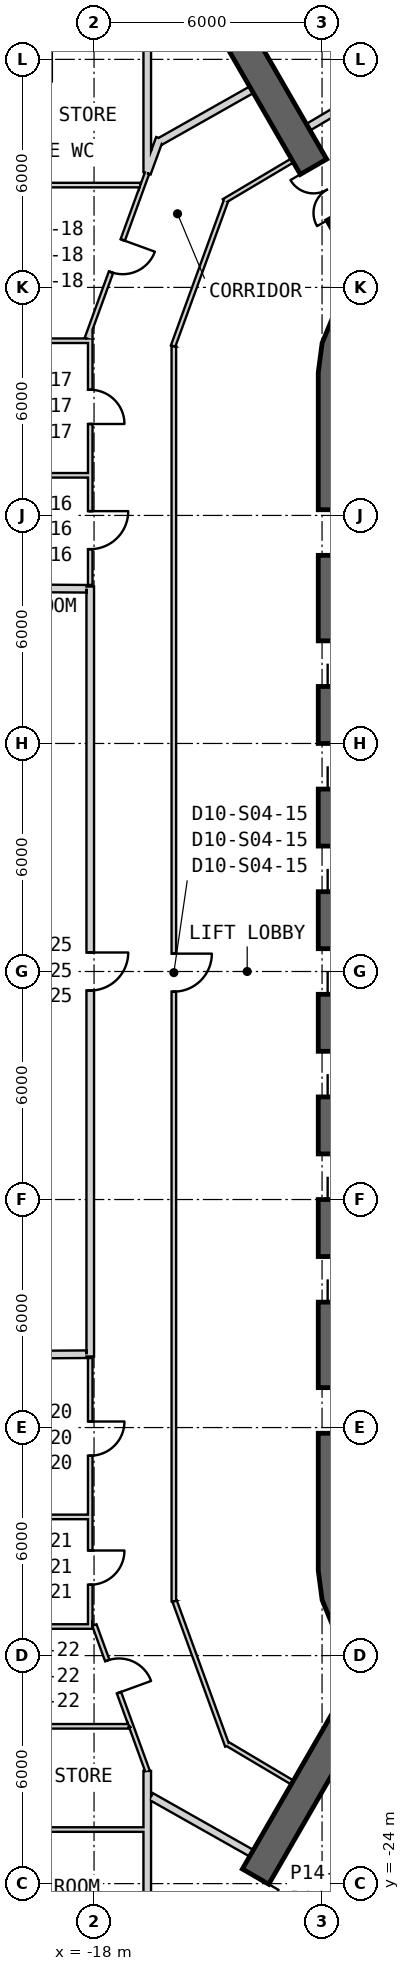
"""IFC4 building model, lengths in metres.
Left out: names, types, materials, properties, quantities, classifications, styles, units other than length and angle.
Written with IfcOpenShell. Run it as: python <this file> out.ifc"""

import sys

from ifc_helpers import new_model, si_unit, direction, frame, frame_2d, origin, place, context, subcontext, project, spatial, polyline, rectangle, outline, extrude, element, fill, save


model = new_model("IFC4")
c1 = context("Model", 3, precision=1e-05, world=origin(), true_north=direction((0.0, 1.0)))
c2 = subcontext(c1, "Body", "Model", "MODEL_VIEW")
j1 = project(units=[si_unit("LENGTHUNIT", "METRE"), si_unit("PLANEANGLEUNIT", "RADIAN")], contexts=[c1])
p1 = place(None, origin())
s1 = spatial("IfcSite", under=j1, at=p1, CompositionType="ELEMENT")
p2 = place(p1, origin())
s2 = spatial("IfcBuilding", under=s1, at=p2, CompositionType="ELEMENT")
p3 = place(p2, frame((0.0, 0.0, 94.7)))
s3 = spatial("IfcBuildingStorey", under=s2, at=p3, CompositionType="ELEMENT", Elevation=94.7)
p4 = place(p3, frame((-11.65, 15.762, 0.0), z_axis=(0.0, 0.0, 1.0), x_axis=(0.0, -1.0, 0.0)))
e1 = element("IfcWall", 1, at=p4, inside=s3, PredefinedType="SHEAR", context=c2, shape_type="SweptSolid", body=[
    extrude(rectangle(XDim=31.523, YDim=0.9, at=frame_2d((15.762, 0.0))), origin(), (0.0, 0.0, 1.0), 4.1),
])
p5 = place(p4, frame((7.062, 0.0, 0.0)))
e2 = element("IfcOpeningElement", 2, at=p5, cuts=e1, PredefinedType="OPENING", context=c2, shape_type="SweptSolid", body=[
    extrude(rectangle(XDim=1.2, YDim=2.4, at=frame_2d((0.6, 1.2))), frame((0.0, 0.46, 0.0), z_axis=(0.0, -1.0, 0.0), x_axis=(1.0, 0.0, 0.0)), (0.0, 0.0, 1.0), 0.92),
])
p6 = place(p4, frame((9.762, 0.0, 0.0)))
e3 = element("IfcOpeningElement", 3, at=p6, cuts=e1, PredefinedType="OPENING", context=c2, shape_type="SweptSolid", body=[
    extrude(rectangle(XDim=1.2, YDim=2.4, at=frame_2d((0.6, 1.2))), frame((0.0, 0.46, 0.0), z_axis=(0.0, -1.0, 0.0), x_axis=(1.0, 0.0, 0.0)), (0.0, 0.0, 1.0), 0.92),
])
p7 = place(p4, frame((12.462, 0.0, 0.0)))
e4 = element("IfcOpeningElement", 4, at=p7, cuts=e1, PredefinedType="OPENING", context=c2, shape_type="SweptSolid", body=[
    extrude(rectangle(XDim=1.2, YDim=2.4, at=frame_2d((0.6, 1.2))), frame((0.0, 0.46, 0.0), z_axis=(0.0, -1.0, 0.0), x_axis=(1.0, 0.0, 0.0)), (0.0, 0.0, 1.0), 0.92),
])
p8 = place(p4, frame((15.162, 0.0, 0.0)))
e5 = element("IfcOpeningElement", 5, at=p8, cuts=e1, PredefinedType="OPENING", context=c2, shape_type="SweptSolid", body=[
    extrude(rectangle(XDim=1.2, YDim=2.4, at=frame_2d((0.6, 1.2))), frame((0.0, 0.46, 0.0), z_axis=(0.0, -1.0, 0.0), x_axis=(1.0, 0.0, 0.0)), (0.0, 0.0, 1.0), 0.92),
])
p9 = place(p4, frame((17.862, 0.0, 0.0)))
e6 = element("IfcOpeningElement", 6, at=p9, cuts=e1, PredefinedType="OPENING", context=c2, shape_type="SweptSolid", body=[
    extrude(rectangle(XDim=1.2, YDim=2.4, at=frame_2d((0.6, 1.2))), frame((0.0, 0.46, 0.0), z_axis=(0.0, -1.0, 0.0), x_axis=(1.0, 0.0, 0.0)), (0.0, 0.0, 1.0), 0.92),
])
p10 = place(p4, frame((20.562, 0.0, 0.0)))
e7 = element("IfcOpeningElement", 7, at=p10, cuts=e1, PredefinedType="OPENING", context=c2, shape_type="SweptSolid", body=[
    extrude(rectangle(XDim=1.2, YDim=2.4, at=frame_2d((0.6, 1.2))), frame((0.0, 0.46, 0.0), z_axis=(0.0, -1.0, 0.0), x_axis=(1.0, 0.0, 0.0)), (0.0, 0.0, 1.0), 0.92),
])
p11 = place(p4, frame((23.262, 0.0, 0.0)))
e8 = element("IfcOpeningElement", 8, at=p11, cuts=e1, PredefinedType="OPENING", context=c2, shape_type="SweptSolid", body=[
    extrude(rectangle(XDim=1.2, YDim=2.4, at=frame_2d((0.6, 1.2))), frame((0.0, 0.46, 0.0), z_axis=(0.0, -1.0, 0.0), x_axis=(1.0, 0.0, 0.0)), (0.0, 0.0, 1.0), 0.92),
])
p12 = place(p4, frame((3.612, 0.0, 0.0)))
e9 = element("IfcOpeningElement", 9, at=p12, cuts=e1, PredefinedType="OPENING", context=c2, shape_type="SweptSolid", body=[
    extrude(rectangle(XDim=1.2, YDim=2.4, at=frame_2d((0.6, 1.2))), frame((0.0, 0.46, 0.0), z_axis=(0.0, -1.0, 0.0), x_axis=(1.0, 0.0, 0.0)), (0.0, 0.0, 1.0), 0.92),
])
p13 = place(p4, frame((26.712, 0.0, 0.0)))
e10 = element("IfcOpeningElement", 10, at=p13, cuts=e1, PredefinedType="OPENING", context=c2, shape_type="SweptSolid", body=[
    extrude(rectangle(XDim=1.2, YDim=2.4, at=frame_2d((0.6, 1.2))), frame((0.0, 0.46, 0.0), z_axis=(0.0, -1.0, 0.0), x_axis=(1.0, 0.0, 0.0)), (0.0, 0.0, 1.0), 0.92),
])
p14 = place(p3, origin())
e11 = element("IfcWall", 11, at=p14, inside=s3, PredefinedType="SHEAR", context=c2, shape_type="SweptSolid", body=[
    extrude(outline(polyline([(-7.6, 18.36), (-8.323, 18.659), (-9.1, 18.762), (-9.876, 18.659), (-10.6, 18.36), (-11.221, 17.883), (-11.698, 17.262), (-11.998, 16.538), (-12.1, 15.762), (-11.2, 15.762), (-11.128, 16.305), (-10.919, 16.812), (-10.585, 17.247), (-10.15, 17.58), (-9.644, 17.79), (-9.1, 17.862), (-8.556, 17.79), (-8.05, 17.58), (-7.6, 18.36)])), origin(), (0.0, 0.0, 1.0), 4.1),
])
p15 = place(p3, origin())
e12 = element("IfcWall", 12, at=p15, inside=s3, PredefinedType="SHEAR", context=c2, shape_type="SweptSolid", body=[
    extrude(outline(polyline([(-12.1, -15.762), (-11.998, -16.538), (-11.698, -17.262), (-11.221, -17.883), (-10.6, -18.36), (-9.876, -18.659), (-9.1, -18.762), (-8.323, -18.659), (-7.6, -18.36), (-8.05, -17.58), (-8.556, -17.79), (-9.1, -17.862), (-9.644, -17.79), (-10.15, -17.58), (-10.585, -17.247), (-10.919, -16.812), (-11.128, -16.305), (-11.2, -15.762), (-12.1, -15.762)])), origin(), (0.0, 0.0, 1.0), 4.1),
])
p16 = place(p3, frame((-10.575, 18.316, 0.0), z_axis=(0.0, 0.0, 1.0), x_axis=(-0.500006018292, 0.866021929094, 0.0)))
e13 = element("IfcWall", 13, at=p16, inside=s3, PredefinedType="SHEAR", context=c2, shape_type="SweptSolid", body=[
    extrude(rectangle(XDim=13.241, YDim=0.8, at=frame_2d((6.621, 0.0))), origin(), (0.0, 0.0, 1.0), 4.1),
])
p17 = place(p16, frame((1.9, 0.0, 0.0)))
e14 = element("IfcOpeningElement", 14, at=p17, cuts=e13, PredefinedType="OPENING", context=c2, shape_type="SweptSolid", body=[
    extrude(rectangle(XDim=1.4, YDim=2.4, at=frame_2d((0.7, 1.2))), frame((0.0, 0.41, 0.0), z_axis=(0.0, -1.0, 0.0), x_axis=(1.0, 0.0, 0.0)), (0.0, 0.0, 1.0), 0.82),
])
p18 = place(p3, frame((-10.575, -18.316, 0.0), z_axis=(0.0, 0.0, 1.0), x_axis=(-0.500006018292, -0.866021929094, 0.0)))
e15 = element("IfcWall", 15, at=p18, inside=s3, PredefinedType="SHEAR", context=c2, shape_type="SweptSolid", body=[
    extrude(rectangle(XDim=13.241, YDim=0.8, at=frame_2d((6.621, 0.0))), origin(), (0.0, 0.0, 1.0), 4.1),
])
p19 = place(p18, frame((6.35, 0.0, 0.0)))
e16 = element("IfcOpeningElement", 16, at=p19, cuts=e15, PredefinedType="OPENING", context=c2, shape_type="SweptSolid", body=[
    extrude(rectangle(XDim=1.4, YDim=2.4, at=frame_2d((0.7, 1.2))), frame((0.0, 0.41, 0.0), z_axis=(0.0, -1.0, 0.0), x_axis=(1.0, 0.0, 0.0)), (0.0, 0.0, 1.0), 0.82),
])
p20 = place(p3, frame((-12.782, 21.339, 0.0), z_axis=(0.0, 0.0, 1.0), x_axis=(-0.859769901207, -0.510681619973, 0.0)))
e17 = element("IfcWall", 17, at=p20, inside=s3, PredefinedType="PARTITIONING", context=c2, shape_type="SweptSolid", body=[
    extrude(rectangle(XDim=2.093, YDim=0.12, at=frame_2d((1.046, 0.0))), origin(), (0.0, 0.0, 1.0), 3.8),
])
p21 = place(p3, frame((-14.528, 20.282, 0.0), z_axis=(0.0, 0.0, 1.0), x_axis=(-0.341969257767, -0.939711140054, 0.0)))
e18 = element("IfcWall", 18, at=p21, inside=s3, PredefinedType="PARTITIONING", context=c2, shape_type="SweptSolid", body=[
    extrude(rectangle(XDim=4.073, YDim=0.12, at=frame_2d((2.037, 0.0))), origin(), (0.0, 0.0, 1.0), 2.88),
])
p22 = place(p3, frame((-15.9, 16.451, 0.0), z_axis=(0.0, 0.0, 1.0), x_axis=(0.0, -1.0, 0.0)))
e19 = element("IfcWall", 19, at=p22, inside=s3, PredefinedType="PARTITIONING", context=c2, shape_type="SweptSolid", body=[
    extrude(rectangle(XDim=33.022, YDim=0.12, at=frame_2d((16.511, 0.0))), origin(), (0.0, 0.0, 1.0), 2.98),
])
p23 = place(p22, frame((15.981, 0.0, 0.0)))
e20 = element("IfcOpeningElement", 20, at=p23, cuts=e19, PredefinedType="OPENING", context=c2, shape_type="SweptSolid", body=[
    extrude(rectangle(XDim=1.0, YDim=2.1, at=frame_2d((0.5, 1.05))), frame((0.0, 0.07, 0.0), z_axis=(0.0, -1.0, 0.0), x_axis=(1.0, 0.0, 0.0)), (0.0, 0.0, 1.0), 0.14),
])
p24 = place(p3, frame((-15.879, -16.567, 0.0), z_axis=(0.0, 0.0, 1.0), x_axis=(0.341999322503, -0.939700198685, 0.0)))
e21 = element("IfcWall", 21, at=p24, inside=s3, PredefinedType="PARTITIONING", context=c2, shape_type="SweptSolid", body=[
    extrude(rectangle(XDim=4.054, YDim=0.12, at=frame_2d((2.027, 0.0))), origin(), (0.0, 0.0, 1.0), 2.88),
])
p25 = place(p3, frame((-14.494, -20.322, 0.0), z_axis=(0.0, 0.0, 1.0), x_axis=(0.859745408261, -0.510722853389, 0.0)))
e22 = element("IfcWall", 22, at=p25, inside=s3, PredefinedType="PARTITIONING", context=c2, shape_type="SweptSolid", body=[
    extrude(rectangle(XDim=1.991, YDim=0.12, at=frame_2d((0.996, 0.0))), origin(), (0.0, 0.0, 1.0), 3.8),
])
p26 = place(p3, frame((-18.1, 10.13, 0.0), z_axis=(0.0, 0.0, 1.0), x_axis=(0.0, -1.0, 0.0)))
e23 = element("IfcWall", 23, at=p26, inside=s3, PredefinedType="PARTITIONING", context=c2, shape_type="SweptSolid", body=[
    extrude(rectangle(XDim=20.26, YDim=0.2, at=frame_2d((10.13, 0.0))), origin(), (0.0, 0.0, 1.0), 3.08),
])
p27 = place(p26, frame((9.63, 0.0, 0.0)))
e24 = element("IfcOpeningElement", 24, at=p27, cuts=e23, PredefinedType="OPENING", context=c2, shape_type="SweptSolid", body=[
    extrude(rectangle(XDim=1.0, YDim=2.1, at=frame_2d((0.5, 1.05))), frame((0.0, 0.11, 0.0), z_axis=(0.0, -1.0, 0.0), x_axis=(1.0, 0.0, 0.0)), (0.0, 0.0, 1.0), 0.22),
])
p28 = place(p3, frame((-16.5, -21.706, 0.0), z_axis=(0.0, 0.0, 1.0), x_axis=(0.870637705421, -0.491924776668, 0.0)))
e25 = element("IfcWall", 25, at=p28, inside=s3, PredefinedType="PARTITIONING", context=c2, shape_type="SweptSolid", body=[
    extrude(rectangle(XDim=3.036, YDim=0.2, at=frame_2d((1.518, 0.0))), origin(), (0.0, 0.0, 1.0), 3.8),
])
p29 = place(p3, frame((-16.271, 21.923, 0.0), z_axis=(0.0, 0.0, 1.0), x_axis=(-0.342165073447, -0.939639857878, 0.0)))
e26 = element("IfcWall", 26, at=p29, inside=s3, PredefinedType="PARTITIONING", context=c2, shape_type="SweptSolid", body=[
    extrude(rectangle(XDim=0.975, YDim=0.2, at=frame_2d((0.488, 0.0))), origin(), (0.0, 0.0, 1.0), 2.88),
])
p30 = place(p3, frame((-13.856, 23.2, 0.0), z_axis=(0.0, 0.0, 1.0), x_axis=(-0.870639942446, -0.491920817426, 0.0)))
e27 = element("IfcWall", 27, at=p30, inside=s3, PredefinedType="PARTITIONING", context=c2, shape_type="SweptSolid", body=[
    extrude(rectangle(XDim=2.771, YDim=0.2, at=frame_2d((1.386, 0.0))), origin(), (0.0, 0.0, 1.0), 3.8),
])
p31 = place(p3, frame((-18.1, 16.899, 0.0), z_axis=(0.0, 0.0, 1.0), x_axis=(0.0, -1.0, 0.0)))
e28 = element("IfcWall", 28, at=p31, inside=s3, PredefinedType="PARTITIONING", context=c2, shape_type="SweptSolid", body=[
    extrude(rectangle(XDim=6.729, YDim=0.12, at=frame_2d((3.365, 0.0))), origin(), (0.0, 0.0, 1.0), 3.08),
])
p32 = place(p31, frame((4.786, 0.0, 0.0)))
e29 = element("IfcOpeningElement", 29, at=p32, cuts=e28, PredefinedType="OPENING", context=c2, shape_type="SweptSolid", body=[
    extrude(rectangle(XDim=1.0, YDim=2.1, at=frame_2d((0.5, 1.05))), frame((0.0, 0.07, 0.0), z_axis=(0.0, -1.0, 0.0), x_axis=(1.0, 0.0, 0.0)), (0.0, 0.0, 1.0), 0.14),
])
p33 = place(p31, frame((1.593, 0.0, 0.0)))
e30 = element("IfcOpeningElement", 30, at=p33, cuts=e28, PredefinedType="OPENING", context=c2, shape_type="SweptSolid", body=[
    extrude(rectangle(XDim=0.9, YDim=2.1, at=frame_2d((0.45, 1.05))), frame((0.0, 0.07, 0.0), z_axis=(0.0, -1.0, 0.0), x_axis=(1.0, 0.0, 0.0)), (0.0, 0.0, 1.0), 0.14),
])
p34 = place(p3, frame((-18.1, -10.17, 0.0), z_axis=(0.0, 0.0, 1.0), x_axis=(0.0, -1.0, 0.0)))
e31 = element("IfcWall", 31, at=p34, inside=s3, PredefinedType="PARTITIONING", context=c2, shape_type="SweptSolid", body=[
    extrude(rectangle(XDim=7.005, YDim=0.12, at=frame_2d((3.503, 0.0))), origin(), (0.0, 0.0, 1.0), 3.08),
])
p35 = place(p34, frame((1.671, 0.0, 0.0)))
e32 = element("IfcOpeningElement", 32, at=p35, cuts=e31, PredefinedType="OPENING", context=c2, shape_type="SweptSolid", body=[
    extrude(rectangle(XDim=0.9, YDim=2.1, at=frame_2d((0.45, 1.05))), frame((0.0, 0.07, 0.0), z_axis=(0.0, -1.0, 0.0), x_axis=(1.0, 0.0, 0.0)), (0.0, 0.0, 1.0), 0.14),
])
p36 = place(p34, frame((5.065, 0.0, 0.0)))
e33 = element("IfcOpeningElement", 33, at=p36, cuts=e31, PredefinedType="OPENING", context=c2, shape_type="SweptSolid", body=[
    extrude(rectangle(XDim=0.9, YDim=2.1, at=frame_2d((0.45, 1.05))), frame((0.0, 0.07, 0.0), z_axis=(0.0, -1.0, 0.0), x_axis=(1.0, 0.0, 0.0)), (0.0, 0.0, 1.0), 0.14),
])
p37 = place(p3, frame((-16.605, 21.006, 0.0), z_axis=(0.0, 0.0, 1.0), x_axis=(-0.342014101174, -0.939694819927, 0.0)))
e34 = element("IfcWall", 34, at=p37, inside=s3, PredefinedType="PARTITIONING", context=c2, shape_type="SweptSolid", body=[
    extrude(rectangle(XDim=4.628, YDim=0.12, at=frame_2d((2.314, 0.0))), origin(), (0.0, 0.0, 1.0), 2.98),
])
p38 = place(p37, frame((1.871, 0.0, 0.0)))
e35 = element("IfcOpeningElement", 35, at=p38, cuts=e34, PredefinedType="OPENING", context=c2, shape_type="SweptSolid", body=[
    extrude(rectangle(XDim=0.9, YDim=2.1, at=frame_2d((0.45, 1.05))), frame((0.0, 0.07, 0.0), z_axis=(0.0, -1.0, 0.0), x_axis=(1.0, 0.0, 0.0)), (0.0, 0.0, 1.0), 0.14),
])
p39 = place(p3, frame((-17.992, -17.196, 0.0), z_axis=(0.0, 0.0, 1.0), x_axis=(0.341997880797, -0.939700723385, 0.0)))
e36 = element("IfcWall", 36, at=p39, inside=s3, PredefinedType="PARTITIONING", context=c2, shape_type="SweptSolid", body=[
    extrude(rectangle(XDim=2.846, YDim=0.12, at=frame_2d((1.423, 0.0))), origin(), (0.0, 0.0, 1.0), 2.98),
])
p40 = place(p39, frame((0.994, 0.0, 0.0)))
e37 = element("IfcOpeningElement", 37, at=p40, cuts=e36, PredefinedType="OPENING", context=c2, shape_type="SweptSolid", body=[
    extrude(rectangle(XDim=0.9, YDim=2.1, at=frame_2d((0.45, 1.05))), frame((0.0, 0.07, 0.0), z_axis=(0.0, -1.0, 0.0), x_axis=(1.0, 0.0, 0.0)), (0.0, 0.0, 1.0), 0.14),
])
p41 = place(p3, frame((-17.019, -19.87, 0.0), z_axis=(0.0, 0.0, 1.0), x_axis=(0.341976406316, -0.939708538603, 0.0)))
e38 = element("IfcWall", 38, at=p41, inside=s3, PredefinedType="PARTITIONING", context=c2, shape_type="SweptSolid", body=[
    extrude(rectangle(XDim=1.26, YDim=0.12, at=frame_2d((0.63, 0.0))), origin(), (0.0, 0.0, 1.0), 2.88),
])
p42 = place(p3, frame((-10.339, 23.415, 0.0), z_axis=(0.0, 0.0, 1.0), x_axis=(-0.860316803263, -0.509759745393, 0.0)))
e39 = element("IfcWall", 39, at=p42, inside=s3, PredefinedType="PARTITIONING", context=c2, shape_type="SweptSolid", body=[
    extrude(rectangle(XDim=2.354, YDim=0.2, at=frame_2d((1.177, 0.0))), origin(), (0.0, 0.0, 1.0), 3.8),
])
p43 = place(p3, frame((-18.2, 10.071, 0.0), z_axis=(0.0, 0.0, 1.0), x_axis=(-0.999977091955, 0.006768719685, 0.0)))
e40 = element("IfcWall", 40, at=p43, inside=s3, PredefinedType="PARTITIONING", context=c2, shape_type="SweptSolid", body=[
    extrude(rectangle(XDim=4.22, YDim=0.2, at=frame_2d((2.11, 0.0))), origin(), (0.0, 0.0, 1.0), 3.8),
])
p44 = place(p3, frame((-16.6, -25.613, 0.0), z_axis=(0.0, 0.0, 1.0), x_axis=(0.0, 1.0, 0.0)))
e41 = element("IfcWall", 41, at=p44, inside=s3, PredefinedType="PARTITIONING", context=c2, shape_type="SweptSolid", body=[
    extrude(rectangle(XDim=3.035, YDim=0.2, at=frame_2d((1.518, 0.0))), origin(), (0.0, 0.0, 1.0), 3.8),
])
p45 = place(p3, frame((-16.6, -22.577, 0.0), z_axis=(0.0, 0.0, 1.0), x_axis=(0.0, 1.0, 0.0)))
e42 = element("IfcWall", 42, at=p45, inside=s3, PredefinedType="PARTITIONING", context=c2, shape_type="SweptSolid", body=[
    extrude(rectangle(XDim=1.542, YDim=0.2, at=frame_2d((0.771, 0.0))), origin(), (0.0, 0.0, 1.0), 2.88),
])
p46 = place(p3, frame((-16.6, 21.036, 0.0), z_axis=(0.0, 0.0, 1.0), x_axis=(0.0, 1.0, 0.0)))
e43 = element("IfcWall", 43, at=p46, inside=s3, PredefinedType="PARTITIONING", context=c2, shape_type="SweptSolid", body=[
    extrude(rectangle(XDim=3.474, YDim=0.2, at=frame_2d((1.737, 0.0))), origin(), (0.0, 0.0, 1.0), 2.88),
])
p47 = place(p3, frame((-22.85, -10.101, 0.0), z_axis=(0.0, 0.0, 1.0), x_axis=(0.999979149644, 0.00645757523, 0.0)))
e44 = element("IfcWall", 44, at=p47, inside=s3, PredefinedType="PARTITIONING", context=c2, shape_type="SweptSolid", body=[
    extrude(rectangle(XDim=4.65, YDim=0.2, at=frame_2d((2.325, 0.0))), origin(), (0.0, 0.0, 1.0), 3.8),
])
p48 = place(p3, frame((-22.42, 13.056, 0.0), z_axis=(0.0, 0.0, 1.0), x_axis=(1.0, 0.0, 0.0)))
e45 = element("IfcWall", 45, at=p48, inside=s3, PredefinedType="PARTITIONING", context=c2, shape_type="SweptSolid", body=[
    extrude(rectangle(XDim=4.26, YDim=0.12, at=frame_2d((2.13, 0.0))), origin(), (0.0, 0.0, 1.0), 3.08),
])
p49 = place(p3, frame((-22.42, 16.597, 0.0), z_axis=(0.0, 0.0, 1.0), x_axis=(1.0, 0.0, 0.0)))
e46 = element("IfcWall", 46, at=p49, inside=s3, PredefinedType="PARTITIONING", context=c2, shape_type="SweptSolid", body=[
    extrude(rectangle(XDim=4.26, YDim=0.12, at=frame_2d((2.13, 0.0))), origin(), (0.0, 0.0, 1.0), 3.8),
])
p50 = place(p3, frame((-22.42, 20.692, 0.0), z_axis=(0.0, 0.0, 1.0), x_axis=(1.0, 0.0, 0.0)))
e47 = element("IfcWall", 47, at=p50, inside=s3, PredefinedType="PARTITIONING", context=c2, shape_type="SweptSolid", body=[
    extrude(rectangle(XDim=5.637, YDim=0.12, at=frame_2d((2.818, 0.0))), origin(), (0.0, 0.0, 1.0), 2.98),
])
p51 = place(p3, frame((-22.65, -14.351, 0.0), z_axis=(0.0, 0.0, 1.0), x_axis=(1.0, 0.0, 0.0)))
e48 = element("IfcWall", 48, at=p51, inside=s3, PredefinedType="PARTITIONING", context=c2, shape_type="SweptSolid", body=[
    extrude(rectangle(XDim=4.49, YDim=0.12, at=frame_2d((2.245, 0.0))), origin(), (0.0, 0.0, 1.0), 3.08),
])
p52 = place(p3, frame((-18.042, -17.235, 0.0), z_axis=(0.0, 0.0, 1.0), x_axis=(-1.0, 0.0, 0.0)))
e49 = element("IfcWall", 49, at=p52, inside=s3, PredefinedType="PARTITIONING", context=c2, shape_type="SweptSolid", body=[
    extrude(rectangle(XDim=4.608, YDim=0.12, at=frame_2d((2.304, 0.0))), origin(), (0.0, 0.0, 1.0), 2.98),
])
p53 = place(p3, frame((-17.086, -19.861, 0.0), z_axis=(0.0, 0.0, 1.0), x_axis=(-1.0, 0.0, 0.0)))
e50 = element("IfcWall", 50, at=p53, inside=s3, PredefinedType="PARTITIONING", context=c2, shape_type="SweptSolid", body=[
    extrude(rectangle(XDim=5.564, YDim=0.12, at=frame_2d((2.782, 0.0))), origin(), (0.0, 0.0, 1.0), 2.98),
])
p54 = place(p53, frame((2.332, 0.0, 0.0)))
e51 = element("IfcOpeningElement", 51, at=p54, cuts=e50, PredefinedType="OPENING", context=c2, shape_type="SweptSolid", body=[
    extrude(rectangle(XDim=0.9, YDim=2.1, at=frame_2d((0.45, 1.05))), frame((0.0, 0.07, 0.0), z_axis=(0.0, -1.0, 0.0), x_axis=(1.0, 0.0, 0.0)), (0.0, 0.0, 1.0), 0.14),
])
p55 = place(p3, frame((-16.7, -22.577, 0.0), z_axis=(0.0, 0.0, 1.0), x_axis=(-1.0, 0.0, 0.0)))
e52 = element("IfcWall", 52, at=p55, inside=s3, PredefinedType="PARTITIONING", context=c2, shape_type="SweptSolid", body=[
    extrude(rectangle(XDim=5.95, YDim=0.12, at=frame_2d((2.975, 0.0))), origin(), (0.0, 0.0, 1.0), 2.88),
])
p56 = place(p23, origin())
e53 = element("IfcDoor", 53, at=p56, inside=s3, OperationType="SINGLE_SWING_RIGHT", PredefinedType="NOTDEFINED", context=c2, shape_type="SweptSolid", body=[
    extrude(rectangle(XDim=1.0, YDim=2.1, at=frame_2d((0.5, 1.05))), frame((0.0, 0.025, 0.0), z_axis=(0.0, -1.0, 0.0), x_axis=(1.0, 0.0, 0.0)), (0.0, 0.0, 1.0), 0.05),
])
fill(e20, e53)
p57 = place(p32, origin())
e54 = element("IfcDoor", 54, at=p57, inside=s3, OperationType="SINGLE_SWING_LEFT", PredefinedType="NOTDEFINED", context=c2, shape_type="SweptSolid", body=[
    extrude(rectangle(XDim=1.0, YDim=2.1, at=frame_2d((0.5, 1.05))), frame((0.0, 0.025, 0.0), z_axis=(0.0, -1.0, 0.0), x_axis=(1.0, 0.0, 0.0)), (0.0, 0.0, 1.0), 0.05),
])
fill(e29, e54)
p58 = place(p33, origin())
e55 = element("IfcDoor", 55, at=p58, inside=s3, OperationType="SINGLE_SWING_RIGHT", PredefinedType="NOTDEFINED", context=c2, shape_type="SweptSolid", body=[
    extrude(rectangle(XDim=0.9, YDim=2.1, at=frame_2d((0.45, 1.05))), frame((0.0, 0.025, 0.0), z_axis=(0.0, -1.0, 0.0), x_axis=(1.0, 0.0, 0.0)), (0.0, 0.0, 1.0), 0.05),
])
fill(e30, e55)
p59 = place(p38, origin())
e56 = element("IfcDoor", 56, at=p59, inside=s3, OperationType="SINGLE_SWING_LEFT", PredefinedType="NOTDEFINED", context=c2, shape_type="SweptSolid", body=[
    extrude(rectangle(XDim=0.9, YDim=2.1, at=frame_2d((0.45, 1.05))), frame((0.0, 0.025, 0.0), z_axis=(0.0, -1.0, 0.0), x_axis=(1.0, 0.0, 0.0)), (0.0, 0.0, 1.0), 0.05),
])
fill(e35, e56)
p60 = place(p35, origin())
e57 = element("IfcDoor", 57, at=p60, inside=s3, OperationType="SINGLE_SWING_LEFT", PredefinedType="NOTDEFINED", context=c2, shape_type="SweptSolid", body=[
    extrude(rectangle(XDim=0.9, YDim=2.1, at=frame_2d((0.45, 1.05))), frame((0.0, 0.025, 0.0), z_axis=(0.0, -1.0, 0.0), x_axis=(1.0, 0.0, 0.0)), (0.0, 0.0, 1.0), 0.05),
])
fill(e32, e57)
p61 = place(p36, origin())
e58 = element("IfcDoor", 58, at=p61, inside=s3, OperationType="SINGLE_SWING_RIGHT", PredefinedType="NOTDEFINED", context=c2, shape_type="SweptSolid", body=[
    extrude(rectangle(XDim=0.9, YDim=2.1, at=frame_2d((0.45, 1.05))), frame((0.0, 0.025, 0.0), z_axis=(0.0, -1.0, 0.0), x_axis=(1.0, 0.0, 0.0)), (0.0, 0.0, 1.0), 0.05),
])
fill(e33, e58)
p62 = place(p40, origin())
e59 = element("IfcDoor", 59, at=p62, inside=s3, OperationType="SINGLE_SWING_LEFT", PredefinedType="NOTDEFINED", context=c2, shape_type="SweptSolid", body=[
    extrude(rectangle(XDim=0.9, YDim=2.1, at=frame_2d((0.45, 1.05))), frame((0.0, 0.025, 0.0), z_axis=(0.0, -1.0, 0.0), x_axis=(1.0, 0.0, 0.0)), (0.0, 0.0, 1.0), 0.05),
])
fill(e37, e59)
p63 = place(p27, origin())
e60 = element("IfcDoor", 60, at=p63, inside=s3, OperationType="SINGLE_SWING_LEFT", PredefinedType="USERDEFINED", context=c2, shape_type="SweptSolid", body=[
    extrude(rectangle(XDim=1.0, YDim=2.1, at=frame_2d((0.5, 1.05))), frame((0.0, 0.025, 0.0), z_axis=(0.0, -1.0, 0.0), x_axis=(1.0, 0.0, 0.0)), (0.0, 0.0, 1.0), 0.05),
])
fill(e24, e60)
p64 = place(p17, origin())
e61 = element("IfcDoor", 61, at=p64, inside=s3, OperationType="DOUBLE_DOOR_SINGLE_SWING", PredefinedType="NOTDEFINED", context=c2, shape_type="SweptSolid", body=[
    extrude(rectangle(XDim=1.4, YDim=2.4, at=frame_2d((0.7, 1.2))), frame((0.0, 0.025, 0.0), z_axis=(0.0, -1.0, 0.0), x_axis=(1.0, 0.0, 0.0)), (0.0, 0.0, 1.0), 0.05),
])
fill(e14, e61)
p65 = place(p19, origin())
e62 = element("IfcDoor", 62, at=p65, inside=s3, OperationType="DOUBLE_DOOR_SINGLE_SWING", PredefinedType="NOTDEFINED", context=c2, shape_type="SweptSolid", body=[
    extrude(rectangle(XDim=1.4, YDim=2.4, at=frame_2d((0.7, 1.2))), frame((0.0, 0.025, 0.0), z_axis=(0.0, -1.0, 0.0), x_axis=(1.0, 0.0, 0.0)), (0.0, 0.0, 1.0), 0.05),
])
fill(e16, e62)
save(model, sys.argv[1])
